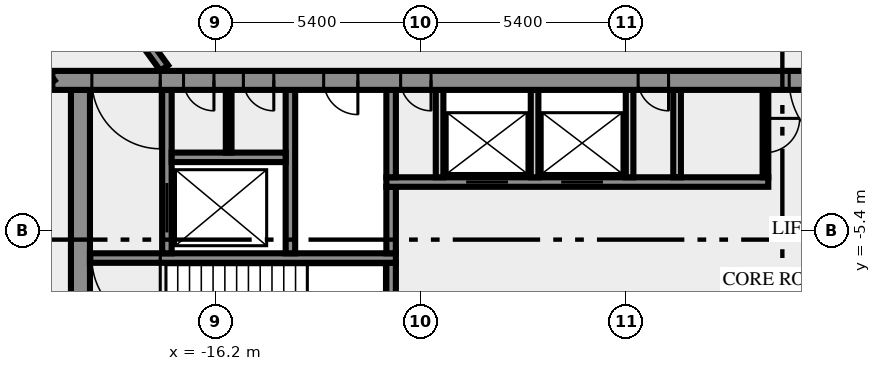
"""IFC4 building model, lengths in metres.
Left out: names, types, materials, properties, quantities, classifications, styles, units other than length and angle.
Written with IfcOpenShell. Run it as: python <this file> out.ifc"""

import sys

from ifc_helpers import new_model, si_unit, direction, frame, frame_2d, origin, place, context, subcontext, project, spatial, rectangle, extrude, element, fill, save


model = new_model("IFC4")
c1 = context("Model", 3, precision=1e-05, world=origin(), true_north=direction((0.0, 1.0)))
c2 = subcontext(c1, "Body", "Model", "MODEL_VIEW")
j1 = project(units=[si_unit("LENGTHUNIT", "METRE"), si_unit("PLANEANGLEUNIT", "RADIAN")], contexts=[c1])
p1 = place(None, origin())
s1 = spatial("IfcSite", under=j1, at=p1, CompositionType="ELEMENT")
p2 = place(p1, origin())
s2 = spatial("IfcBuilding", under=s1, at=p2, CompositionType="ELEMENT")
p3 = place(p2, frame((0.0, 0.0, 339.0)))
s3 = spatial("IfcBuildingStorey", under=s2, at=p3, CompositionType="ELEMENT", Elevation=339.0)
p4 = place(p3, frame((-19.75, -10.5, 0.0), z_axis=(0.0, 0.0, 1.0), x_axis=(0.0, 1.0, 0.0)))
e1 = element("IfcWall", 1, at=p4, inside=s3, PredefinedType="SHEAR", context=c2, shape_type="SweptSolid", body=[
    extrude(rectangle(XDim=8.8, YDim=0.5, at=frame_2d((4.4, 0.0))), origin(), (0.0, 0.0, 1.0), 3.65),
])
p5 = place(p3, frame((-11.575, -7.25, 0.0), z_axis=(0.0, 0.0, 1.0), x_axis=(0.0, 1.0, 0.0)))
e2 = element("IfcWall", 2, at=p5, inside=s3, PredefinedType="SHEAR", context=c2, shape_type="SweptSolid", body=[
    extrude(rectangle(XDim=1.0, YDim=0.25, at=frame_2d((0.5, 0.0))), origin(), (0.0, 0.0, 1.0), 3.65),
])
p6 = place(p3, frame((-11.45, -6.125, 0.0), z_axis=(0.0, 0.0, 1.0), x_axis=(-1.0, 0.0, 0.0)))
e3 = element("IfcWall", 3, at=p6, inside=s3, PredefinedType="SHEAR", context=c2, shape_type="SweptSolid", body=[
    extrude(rectangle(XDim=8.05, YDim=0.25, at=frame_2d((4.025, 0.0))), origin(), (0.0, 0.0, 1.0), 3.65),
])
p7 = place(p6, frame((6.2, 0.0, 0.0)))
e4 = element("IfcOpeningElement", 4, at=p7, cuts=e3, PredefinedType="OPENING", context=c2, shape_type="SweptSolid", body=[
    extrude(rectangle(XDim=1.8, YDim=2.1, at=frame_2d((0.9, 1.05))), frame((0.0, 0.135, 0.0), z_axis=(0.0, -1.0, 0.0), x_axis=(1.0, 0.0, 0.0)), (0.0, 0.0, 1.0), 0.27),
])
p8 = place(p3, frame((-17.475, -6.0, 0.0), z_axis=(0.0, 0.0, 1.0), x_axis=(0.0, 1.0, 0.0)))
e5 = element("IfcWall", 5, at=p8, inside=s3, PredefinedType="SHEAR", context=c2, shape_type="SweptSolid", body=[
    extrude(rectangle(XDim=4.3, YDim=0.25, at=frame_2d((2.15, 0.0))), origin(), (0.0, 0.0, 1.0), 3.65),
])
p9 = place(p8, frame((0.55, 0.0, 0.0)))
e6 = element("IfcOpeningElement", 6, at=p9, cuts=e5, PredefinedType="OPENING", context=c2, shape_type="SweptSolid", body=[
    extrude(rectangle(XDim=1.3, YDim=2.1, at=frame_2d((0.65, 1.05))), frame((0.0, 0.135, 0.0), z_axis=(0.0, -1.0, 0.0), x_axis=(1.0, 0.0, 0.0)), (0.0, 0.0, 1.0), 0.27),
])
p10 = place(p3, frame((-14.225, -6.0, 0.0), z_axis=(0.0, 0.0, 1.0), x_axis=(0.0, 1.0, 0.0)))
e7 = element("IfcWall", 7, at=p10, inside=s3, PredefinedType="SHEAR", context=c2, shape_type="SweptSolid", body=[
    extrude(rectangle(XDim=4.3, YDim=0.25, at=frame_2d((2.15, 0.0))), origin(), (0.0, 0.0, 1.0), 3.65),
])
p11 = place(p3, frame((-11.575, -6.0, 0.0), z_axis=(0.0, 0.0, 1.0), x_axis=(0.0, 1.0, 0.0)))
e8 = element("IfcWall", 8, at=p11, inside=s3, PredefinedType="SHEAR", context=c2, shape_type="SweptSolid", body=[
    extrude(rectangle(XDim=1.75, YDim=0.25, at=frame_2d((0.875, 0.0))), origin(), (0.0, 0.0, 1.0), 3.65),
])
p12 = place(p3, frame((-11.7, -4.125, 0.0), z_axis=(0.0, 0.0, 1.0), x_axis=(1.0, 0.0, 0.0)))
e9 = element("IfcWall", 9, at=p12, inside=s3, PredefinedType="SHEAR", context=c2, shape_type="SweptSolid", body=[
    extrude(rectangle(XDim=10.05, YDim=0.25, at=frame_2d((5.025, 0.0))), origin(), (0.0, 0.0, 1.0), 3.65),
])
p13 = place(p12, frame((2.1, 0.0, 0.0)))
e10 = element("IfcOpeningElement", 10, at=p13, cuts=e9, PredefinedType="OPENING", context=c2, shape_type="SweptSolid", body=[
    extrude(rectangle(XDim=1.1, YDim=2.1, at=frame_2d((0.55, 1.05))), frame((0.0, 0.135, 0.0), z_axis=(0.0, -1.0, 0.0), x_axis=(1.0, 0.0, 0.0)), (0.0, 0.0, 1.0), 0.27),
])
p14 = place(p12, frame((4.6, 0.0, 0.0)))
e11 = element("IfcOpeningElement", 11, at=p14, cuts=e9, PredefinedType="OPENING", context=c2, shape_type="SweptSolid", body=[
    extrude(rectangle(XDim=1.1, YDim=2.1, at=frame_2d((0.55, 1.05))), frame((0.0, 0.135, 0.0), z_axis=(0.0, -1.0, 0.0), x_axis=(1.0, 0.0, 0.0)), (0.0, 0.0, 1.0), 0.27),
])
p15 = place(p3, frame((-11.575, -4.0, 0.0), z_axis=(0.0, 0.0, 1.0), x_axis=(0.0, 1.0, 0.0)))
e12 = element("IfcWall", 12, at=p15, inside=s3, PredefinedType="SHEAR", context=c2, shape_type="SweptSolid", body=[
    extrude(rectangle(XDim=2.3, YDim=0.25, at=frame_2d((1.15, 0.0))), origin(), (0.0, 0.0, 1.0), 3.65),
])
for number, where, z_axis, x_axis in (
    (13, (-10.3, -4.0, 0.0), (0.0, 0.0, 1.0), (0.0, 1.0, 0.0)),
    (14, (-7.8, -4.0, 0.0), (0.0, 0.0, 1.0), (0.0, 1.0, 0.0)),
    (15, (-5.3, -4.0, 0.0), (0.0, 0.0, 1.0), (0.0, 1.0, 0.0)),
    (16, (-4.05, -4.0, 0.0), (0.0, 0.0, 1.0), (0.0, 1.0, 0.0)),
):
    element("IfcWall", number, at=place(p3, frame(where, z_axis=z_axis, x_axis=x_axis)), inside=s3, PredefinedType="SOLIDWALL", context=c2, shape_type="SweptSolid", body=[
        extrude(rectangle(XDim=2.3, YDim=0.2, at=frame_2d((1.15, 0.0))), origin(), (0.0, 0.0, 1.0), 3.65),
    ])
p16 = place(p3, frame((-1.725, -1.7, 0.0), z_axis=(0.0, 0.0, 1.0), x_axis=(0.0, -1.0, 0.0)))
e17 = element("IfcWall", 17, at=p16, inside=s3, PredefinedType="PARTITIONING", context=c2, shape_type="SweptSolid", body=[
    extrude(rectangle(XDim=2.3, YDim=0.15, at=frame_2d((1.15, 0.0))), origin(), (0.0, 0.0, 1.0), 3.65),
])
p17 = place(p16, frame((0.75, 0.0, 0.0)))
e18 = element("IfcOpeningElement", 18, at=p17, cuts=e17, PredefinedType="OPENING", context=c2, shape_type="SweptSolid", body=[
    extrude(rectangle(XDim=0.9, YDim=2.1, at=frame_2d((0.45, 1.05))), frame((0.0, 0.085, 0.0), z_axis=(0.0, -1.0, 0.0), x_axis=(1.0, 0.0, 0.0)), (0.0, 0.0, 1.0), 0.17),
])
p18 = place(p3, frame((-17.35, -3.475, 0.0), z_axis=(0.0, 0.0, 1.0), x_axis=(1.0, 0.0, 0.0)))
e19 = element("IfcWall", 19, at=p18, inside=s3, PredefinedType="SHEAR", context=c2, shape_type="SweptSolid", body=[
    extrude(rectangle(XDim=3.0, YDim=0.25, at=frame_2d((1.5, 0.0))), origin(), (0.0, 0.0, 1.0), 3.65),
])
p19 = place(p3, frame((-15.85, -3.35, 0.0), z_axis=(0.0, 0.0, 1.0), x_axis=(0.0, 1.0, 0.0)))
e20 = element("IfcWall", 20, at=p19, inside=s3, PredefinedType="PARTITIONING", context=c2, shape_type="SweptSolid", body=[
    extrude(rectangle(XDim=1.65, YDim=0.15, at=frame_2d((0.825, 0.0))), origin(), (0.0, 0.0, 1.0), 3.65),
])
p20 = place(p3, frame((20.49, -1.45, 0.0), z_axis=(0.0, 0.0, 1.0), x_axis=(-1.0, 0.0, 0.0)))
e21 = element("IfcWall", 21, at=p20, inside=s3, PredefinedType="SHEAR", context=c2, shape_type="SweptSolid", body=[
    extrude(rectangle(XDim=40.98, YDim=0.5, at=frame_2d((20.49, 0.0))), origin(), (0.0, 0.0, 1.0), 3.65),
])
p21 = place(p20, frame((38.14, 0.0, 0.0)))
e22 = element("IfcOpeningElement", 22, at=p21, cuts=e21, PredefinedType="OPENING", context=c2, shape_type="SweptSolid", body=[
    extrude(rectangle(XDim=1.8, YDim=2.1, at=frame_2d((0.9, 1.05))), frame((0.0, 0.26, 0.0), z_axis=(0.0, -1.0, 0.0), x_axis=(1.0, 0.0, 0.0)), (0.0, 0.0, 1.0), 0.52),
])
p22 = place(p20, frame((36.728, 0.0, 0.0)))
e23 = element("IfcOpeningElement", 23, at=p22, cuts=e21, PredefinedType="OPENING", context=c2, shape_type="SweptSolid", body=[
    extrude(rectangle(XDim=0.8, YDim=2.1, at=frame_2d((0.4, 1.05))), frame((0.0, 0.26, 0.0), z_axis=(0.0, -1.0, 0.0), x_axis=(1.0, 0.0, 0.0)), (0.0, 0.0, 1.0), 0.52),
])
p23 = place(p20, frame((35.153, 0.0, 0.0)))
e24 = element("IfcOpeningElement", 24, at=p23, cuts=e21, PredefinedType="OPENING", context=c2, shape_type="SweptSolid", body=[
    extrude(rectangle(XDim=0.8, YDim=2.1, at=frame_2d((0.4, 1.05))), frame((0.0, 0.26, 0.0), z_axis=(0.0, -1.0, 0.0), x_axis=(1.0, 0.0, 0.0)), (0.0, 0.0, 1.0), 0.52),
])
p24 = place(p20, frame((32.94, 0.0, 0.0)))
e25 = element("IfcOpeningElement", 25, at=p24, cuts=e21, PredefinedType="OPENING", context=c2, shape_type="SweptSolid", body=[
    extrude(rectangle(XDim=0.9, YDim=2.1, at=frame_2d((0.45, 1.05))), frame((0.0, 0.26, 0.0), z_axis=(0.0, -1.0, 0.0), x_axis=(1.0, 0.0, 0.0)), (0.0, 0.0, 1.0), 0.52),
])
p25 = place(p20, frame((31.015, 0.0, 0.0)))
e26 = element("IfcOpeningElement", 26, at=p25, cuts=e21, PredefinedType="OPENING", context=c2, shape_type="SweptSolid", body=[
    extrude(rectangle(XDim=0.8, YDim=2.1, at=frame_2d((0.4, 1.05))), frame((0.0, 0.26, 0.0), z_axis=(0.0, -1.0, 0.0), x_axis=(1.0, 0.0, 0.0)), (0.0, 0.0, 1.0), 0.52),
])
p26 = place(p20, frame((24.765, 0.0, 0.0)))
e27 = element("IfcOpeningElement", 27, at=p26, cuts=e21, PredefinedType="OPENING", context=c2, shape_type="SweptSolid", body=[
    extrude(rectangle(XDim=0.8, YDim=2.1, at=frame_2d((0.4, 1.05))), frame((0.0, 0.26, 0.0), z_axis=(0.0, -1.0, 0.0), x_axis=(1.0, 0.0, 0.0)), (0.0, 0.0, 1.0), 0.52),
])
p27 = place(p20, frame((19.59, 0.0, 0.0)))
e28 = element("IfcOpeningElement", 28, at=p27, cuts=e21, PredefinedType="OPENING", context=c2, shape_type="SweptSolid", body=[
    extrude(rectangle(XDim=2.0, YDim=2.1, at=frame_2d((1.0, 1.05))), frame((0.0, 0.26, 0.0), z_axis=(0.0, -1.0, 0.0), x_axis=(1.0, 0.0, 0.0)), (0.0, 0.0, 1.0), 0.52),
])
p28 = place(p20, frame((15.103, 0.0, 0.0)))
e29 = element("IfcOpeningElement", 29, at=p28, cuts=e21, PredefinedType="OPENING", context=c2, shape_type="SweptSolid", body=[
    extrude(rectangle(XDim=0.9, YDim=2.1, at=frame_2d((0.45, 1.05))), frame((0.0, 0.26, 0.0), z_axis=(0.0, -1.0, 0.0), x_axis=(1.0, 0.0, 0.0)), (0.0, 0.0, 1.0), 0.52),
])
p29 = place(p20, frame((13.04, 0.0, 0.0)))
e30 = element("IfcOpeningElement", 30, at=p29, cuts=e21, PredefinedType="OPENING", context=c2, shape_type="SweptSolid", body=[
    extrude(rectangle(XDim=0.9, YDim=2.1, at=frame_2d((0.45, 1.05))), frame((0.0, 0.26, 0.0), z_axis=(0.0, -1.0, 0.0), x_axis=(1.0, 0.0, 0.0)), (0.0, 0.0, 1.0), 0.52),
])
p30 = place(p20, frame((10.177, 0.0, 0.0)))
e31 = element("IfcOpeningElement", 31, at=p30, cuts=e21, PredefinedType="OPENING", context=c2, shape_type="SweptSolid", body=[
    extrude(rectangle(XDim=0.9, YDim=2.1, at=frame_2d((0.45, 1.05))), frame((0.0, 0.26, 0.0), z_axis=(0.0, -1.0, 0.0), x_axis=(1.0, 0.0, 0.0)), (0.0, 0.0, 1.0), 0.52),
])
p31 = place(p20, frame((7.14, 0.0, 0.0)))
e32 = element("IfcOpeningElement", 32, at=p31, cuts=e21, PredefinedType="OPENING", context=c2, shape_type="SweptSolid", body=[
    extrude(rectangle(XDim=0.9, YDim=2.1, at=frame_2d((0.45, 1.05))), frame((0.0, 0.26, 0.0), z_axis=(0.0, -1.0, 0.0), x_axis=(1.0, 0.0, 0.0)), (0.0, 0.0, 1.0), 0.52),
])
p32 = place(p20, frame((4.19, 0.0, 0.0)))
e33 = element("IfcOpeningElement", 33, at=p32, cuts=e21, PredefinedType="OPENING", context=c2, shape_type="SweptSolid", body=[
    extrude(rectangle(XDim=0.9, YDim=2.1, at=frame_2d((0.45, 1.05))), frame((0.0, 0.26, 0.0), z_axis=(0.0, -1.0, 0.0), x_axis=(1.0, 0.0, 0.0)), (0.0, 0.0, 1.0), 0.52),
])
p33 = place(p20, frame((1.04, 0.0, 0.0)))
e34 = element("IfcOpeningElement", 34, at=p33, cuts=e21, PredefinedType="OPENING", context=c2, shape_type="SweptSolid", body=[
    extrude(rectangle(XDim=1.8, YDim=2.1, at=frame_2d((0.9, 1.05))), frame((0.0, 0.26, 0.0), z_axis=(0.0, -1.0, 0.0), x_axis=(1.0, 0.0, 0.0)), (0.0, 0.0, 1.0), 0.52),
])
p34 = place(p3, frame((-20.531, -1.523, 0.0), z_axis=(0.0, 0.0, 1.0), x_axis=(-0.587785867777, 0.809016547199, 0.0)))
e35 = element("IfcWall", 35, at=p34, inside=s3, PredefinedType="SOLIDWALL", context=c2, shape_type="SweptSolid", body=[
    extrude(rectangle(XDim=16.67, YDim=0.25, at=frame_2d((8.335, 0.0))), origin(), (0.0, 0.0, 1.0), 3.65),
])
p35 = place(p34, frame((0.533, 0.0, 0.0)))
e36 = element("IfcOpeningElement", 36, at=p35, cuts=e35, PredefinedType="OPENING", context=c2, shape_type="SweptSolid", body=[
    extrude(rectangle(XDim=0.9, YDim=2.1, at=frame_2d((0.45, 1.05))), frame((0.0, 0.135, 0.0), z_axis=(0.0, -1.0, 0.0), x_axis=(1.0, 0.0, 0.0)), (0.0, 0.0, 1.0), 0.27),
])
p36 = place(p34, frame((15.296, 0.0, 0.0)))
e37 = element("IfcOpeningElement", 37, at=p36, cuts=e35, PredefinedType="OPENING", context=c2, shape_type="SweptSolid", body=[
    extrude(rectangle(XDim=0.9, YDim=2.1, at=frame_2d((0.45, 1.05))), frame((0.0, 0.135, 0.0), z_axis=(0.0, -1.0, 0.0), x_axis=(1.0, 0.0, 0.0)), (0.0, 0.0, 1.0), 0.27),
])
p37 = place(p3, frame((-28.039, 13.319, 0.0), z_axis=(0.0, 0.0, 1.0), x_axis=(0.587791911753, -0.809012155952, 0.0)))
e38 = element("IfcWall", 38, at=p37, inside=s3, PredefinedType="SOLIDWALL", context=c2, shape_type="SweptSolid", body=[
    extrude(rectangle(XDim=17.853, YDim=0.25, at=frame_2d((8.927, 0.0))), origin(), (0.0, 0.0, 1.0), 3.65),
])
p38 = place(p37, frame((0.225, 0.0, 0.0)))
e39 = element("IfcOpeningElement", 39, at=p38, cuts=e38, PredefinedType="OPENING", context=c2, shape_type="SweptSolid", body=[
    extrude(rectangle(XDim=0.9, YDim=2.1, at=frame_2d((0.45, 1.05))), frame((0.0, 0.135, 0.0), z_axis=(0.0, -1.0, 0.0), x_axis=(1.0, 0.0, 0.0)), (0.0, 0.0, 1.0), 0.27),
])
p39 = place(p7, origin())
e40 = element("IfcDoor", 40, at=p39, inside=s3, OperationType="DOUBLE_DOOR_SINGLE_SWING", PredefinedType="DOOR", context=c2, shape_type="SweptSolid", body=[
    extrude(rectangle(XDim=1.8, YDim=2.1, at=frame_2d((0.9, 1.05))), frame((0.0, 0.025, 0.0), z_axis=(0.0, -1.0, 0.0), x_axis=(1.0, 0.0, 0.0)), (0.0, 0.0, 1.0), 0.05),
])
fill(e4, e40)
p40 = place(p9, origin())
e41 = element("IfcDoor", 41, at=p40, inside=s3, OperationType="DOUBLE_DOOR_SLIDING", PredefinedType="DOOR", context=c2, shape_type="SweptSolid", body=[
    extrude(rectangle(XDim=1.3, YDim=2.1, at=frame_2d((0.65, 1.05))), frame((0.0, 0.025, 0.0), z_axis=(0.0, -1.0, 0.0), x_axis=(1.0, 0.0, 0.0)), (0.0, 0.0, 1.0), 0.05),
])
fill(e6, e41)
p41 = place(p13, origin())
e42 = element("IfcDoor", 42, at=p41, inside=s3, OperationType="DOUBLE_DOOR_SLIDING", PredefinedType="DOOR", context=c2, shape_type="SweptSolid", body=[
    extrude(rectangle(XDim=1.1, YDim=2.1, at=frame_2d((0.55, 1.05))), frame((0.0, 0.025, 0.0), z_axis=(0.0, -1.0, 0.0), x_axis=(1.0, 0.0, 0.0)), (0.0, 0.0, 1.0), 0.05),
])
fill(e10, e42)
p42 = place(p14, origin())
e43 = element("IfcDoor", 43, at=p42, inside=s3, OperationType="DOUBLE_DOOR_SLIDING", PredefinedType="DOOR", context=c2, shape_type="SweptSolid", body=[
    extrude(rectangle(XDim=1.1, YDim=2.1, at=frame_2d((0.55, 1.05))), frame((0.0, 0.025, 0.0), z_axis=(0.0, -1.0, 0.0), x_axis=(1.0, 0.0, 0.0)), (0.0, 0.0, 1.0), 0.05),
])
fill(e11, e43)
p43 = place(p17, origin())
e44 = element("IfcDoor", 44, at=p43, inside=s3, OperationType="SINGLE_SWING_RIGHT", PredefinedType="DOOR", context=c2, shape_type="SweptSolid", body=[
    extrude(rectangle(XDim=0.9, YDim=2.1, at=frame_2d((0.45, 1.05))), frame((0.0, 0.025, 0.0), z_axis=(0.0, -1.0, 0.0), x_axis=(1.0, 0.0, 0.0)), (0.0, 0.0, 1.0), 0.05),
])
fill(e18, e44)
p44 = place(p21, origin())
e45 = element("IfcDoor", 45, at=p44, inside=s3, OperationType="DOUBLE_DOOR_SINGLE_SWING", PredefinedType="DOOR", context=c2, shape_type="SweptSolid", body=[
    extrude(rectangle(XDim=1.8, YDim=2.1, at=frame_2d((0.9, 1.05))), frame((0.0, 0.025, 0.0), z_axis=(0.0, -1.0, 0.0), x_axis=(1.0, 0.0, 0.0)), (0.0, 0.0, 1.0), 0.05),
])
fill(e22, e45)
p45 = place(p22, origin())
e46 = element("IfcDoor", 46, at=p45, inside=s3, OperationType="SINGLE_SWING_RIGHT", PredefinedType="DOOR", context=c2, shape_type="SweptSolid", body=[
    extrude(rectangle(XDim=0.8, YDim=2.1, at=frame_2d((0.4, 1.05))), frame((0.0, 0.025, 0.0), z_axis=(0.0, -1.0, 0.0), x_axis=(1.0, 0.0, 0.0)), (0.0, 0.0, 1.0), 0.05),
])
fill(e23, e46)
p46 = place(p23, origin())
e47 = element("IfcDoor", 47, at=p46, inside=s3, OperationType="SINGLE_SWING_RIGHT", PredefinedType="DOOR", context=c2, shape_type="SweptSolid", body=[
    extrude(rectangle(XDim=0.8, YDim=2.1, at=frame_2d((0.4, 1.05))), frame((0.0, 0.025, 0.0), z_axis=(0.0, -1.0, 0.0), x_axis=(1.0, 0.0, 0.0)), (0.0, 0.0, 1.0), 0.05),
])
fill(e24, e47)
p47 = place(p24, origin())
e48 = element("IfcDoor", 48, at=p47, inside=s3, OperationType="SINGLE_SWING_RIGHT", PredefinedType="DOOR", context=c2, shape_type="SweptSolid", body=[
    extrude(rectangle(XDim=0.9, YDim=2.1, at=frame_2d((0.45, 1.05))), frame((0.0, 0.025, 0.0), z_axis=(0.0, -1.0, 0.0), x_axis=(1.0, 0.0, 0.0)), (0.0, 0.0, 1.0), 0.05),
])
fill(e25, e48)
p48 = place(p25, origin())
e49 = element("IfcDoor", 49, at=p48, inside=s3, OperationType="SINGLE_SWING_RIGHT", PredefinedType="DOOR", context=c2, shape_type="SweptSolid", body=[
    extrude(rectangle(XDim=0.8, YDim=2.1, at=frame_2d((0.4, 1.05))), frame((0.0, 0.025, 0.0), z_axis=(0.0, -1.0, 0.0), x_axis=(1.0, 0.0, 0.0)), (0.0, 0.0, 1.0), 0.05),
])
fill(e26, e49)
p49 = place(p26, origin())
e50 = element("IfcDoor", 50, at=p49, inside=s3, OperationType="SINGLE_SWING_RIGHT", PredefinedType="DOOR", context=c2, shape_type="SweptSolid", body=[
    extrude(rectangle(XDim=0.8, YDim=2.1, at=frame_2d((0.4, 1.05))), frame((0.0, 0.025, 0.0), z_axis=(0.0, -1.0, 0.0), x_axis=(1.0, 0.0, 0.0)), (0.0, 0.0, 1.0), 0.05),
])
fill(e27, e50)
p50 = place(p27, origin())
e51 = element("IfcDoor", 51, at=p50, inside=s3, OperationType="DOUBLE_DOOR_SINGLE_SWING", PredefinedType="DOOR", context=c2, shape_type="SweptSolid", body=[
    extrude(rectangle(XDim=2.0, YDim=2.1, at=frame_2d((1.0, 1.05))), frame((0.0, 0.025, 0.0), z_axis=(0.0, -1.0, 0.0), x_axis=(1.0, 0.0, 0.0)), (0.0, 0.0, 1.0), 0.05),
])
fill(e28, e51)
save(model, sys.argv[1])
